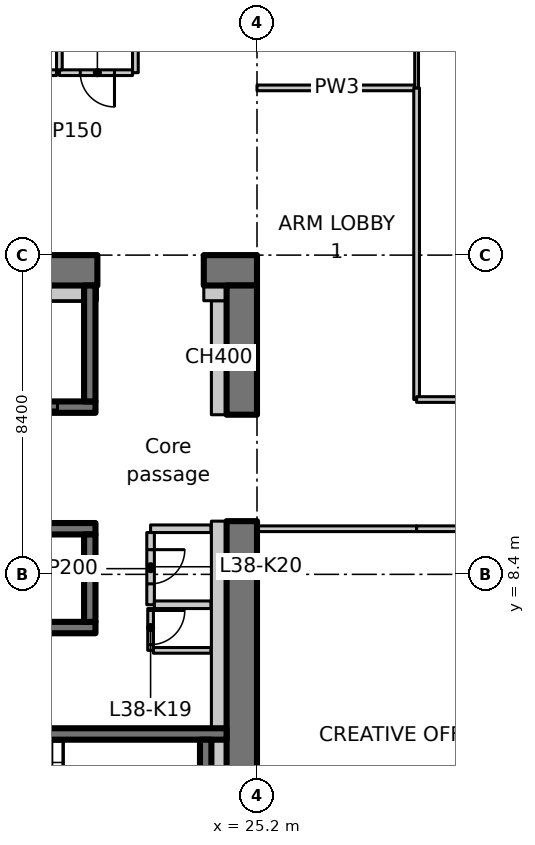
"""IFC4 building model, lengths in metres.
Left out: names, types, materials, properties, quantities, classifications, styles, units other than length and angle.
Written with IfcOpenShell. Run it as: python <this file> out.ifc"""

import sys

from ifc_helpers import new_model, si_unit, direction, frame, frame_2d, origin, place, context, subcontext, project, spatial, polyline, rectangle, outline, extrude, element, fill, save


model = new_model("IFC4")
c1 = context("Model", 3, precision=1e-05, world=origin(), true_north=direction((0.0, 1.0)))
c2 = subcontext(c1, "Body", "Model", "MODEL_VIEW")
j1 = project(units=[si_unit("LENGTHUNIT", "METRE"), si_unit("PLANEANGLEUNIT", "RADIAN")], contexts=[c1])
p1 = place(None, origin())
s1 = spatial("IfcSite", under=j1, at=p1, CompositionType="ELEMENT")
p2 = place(p1, origin())
s2 = spatial("IfcBuilding", under=s1, at=p2, CompositionType="ELEMENT")
p3 = place(p2, frame((0.0, 0.0, 152.9)))
s3 = spatial("IfcBuildingStorey", under=s2, at=p3, CompositionType="ELEMENT", Elevation=152.9)
p4 = place(p3, frame((-1.1, 16.4, 0.0), z_axis=(0.0, 0.0, 1.0), x_axis=(1.0, 0.0, 0.0)))
e1 = element("IfcWall", 1, at=p4, inside=s3, PredefinedType="SHEAR", context=c2, shape_type="SweptSolid", body=[
    extrude(rectangle(XDim=22.1, YDim=0.8, at=frame_2d((11.05, 0.0))), origin(), (0.0, 0.0, 1.0), 3.3),
])
p5 = place(p4, frame((3.15, 0.0, 0.0)))
e2 = element("IfcOpeningElement", 2, at=p5, cuts=e1, PredefinedType="OPENING", context=c2, shape_type="SweptSolid", body=[
    extrude(rectangle(XDim=1.1, YDim=2.3, at=frame_2d((0.55, 1.15))), frame((0.0, 0.41, 0.0), z_axis=(0.0, -1.0, 0.0), x_axis=(1.0, 0.0, 0.0)), (0.0, 0.0, 1.0), 0.82),
])
p6 = place(p3, frame((23.8, 16.4, 0.0), z_axis=(0.0, 0.0, 1.0), x_axis=(1.0, 0.0, 0.0)))
e3 = element("IfcWall", 3, at=p6, inside=s3, PredefinedType="SHEAR", context=c2, shape_type="SweptSolid", body=[
    extrude(rectangle(XDim=1.4, YDim=0.8, at=frame_2d((0.7, 0.0))), origin(), (0.0, 0.0, 1.0), 3.3),
])
p7 = place(p3, frame((24.8, 0.8, 0.0), z_axis=(0.0, 0.0, 1.0), x_axis=(0.0, 1.0, 0.0)))
e4 = element("IfcWall", 4, at=p7, inside=s3, PredefinedType="SHEAR", context=c2, shape_type="SweptSolid", body=[
    extrude(rectangle(XDim=9.0, YDim=0.8, at=frame_2d((4.5, 0.0))), origin(), (0.0, 0.0, 1.0), 3.3),
])
p8 = place(p3, frame((24.8, 12.6, 0.0), z_axis=(0.0, 0.0, 1.0), x_axis=(0.0, 1.0, 0.0)))
e5 = element("IfcWall", 5, at=p8, inside=s3, PredefinedType="SHEAR", context=c2, shape_type="SweptSolid", body=[
    extrude(rectangle(XDim=3.4, YDim=0.8, at=frame_2d((1.7, 0.0))), origin(), (0.0, 0.0, 1.0), 3.3),
])
p9 = place(p3, frame((24.2, 12.6, 0.0), z_axis=(0.0, 0.0, 1.0), x_axis=(0.0, 1.0, 0.0)))
e6 = element("IfcWall", 6, at=p9, inside=s3, PredefinedType="PARTITIONING", context=c2, shape_type="SweptSolid", body=[
    extrude(rectangle(XDim=3.0, YDim=0.4, at=frame_2d((1.5, 0.0))), origin(), (0.0, 0.0, 1.0), 3.3),
])
p10 = place(p3, frame((23.8, 15.8, 0.0), z_axis=(0.0, 0.0, 1.0), x_axis=(1.0, 0.0, 0.0)))
e7 = element("IfcWall", 7, at=p10, inside=s3, PredefinedType="PARTITIONING", context=c2, shape_type="SweptSolid", body=[
    extrude(rectangle(XDim=0.6, YDim=0.4, at=frame_2d((0.3, 0.0))), origin(), (0.0, 0.0, 1.0), 3.3),
])
p11 = place(p3, frame((0.8, 7.0, 0.0), z_axis=(0.0, 0.0, 1.0), x_axis=(1.0, 0.0, 0.0)))
e8 = element("IfcWall", 8, at=p11, inside=s3, PredefinedType="SHEAR", context=c2, shape_type="SweptSolid", body=[
    extrude(rectangle(XDim=20.15, YDim=0.3, at=frame_2d((10.075, 0.0))), origin(), (0.0, 0.0, 1.0), 3.3),
])
p12 = place(p3, frame((0.8, 9.6, 0.0), z_axis=(0.0, 0.0, 1.0), x_axis=(1.0, 0.0, 0.0)))
e9 = element("IfcWall", 9, at=p12, inside=s3, PredefinedType="SHEAR", context=c2, shape_type="SweptSolid", body=[
    extrude(rectangle(XDim=20.15, YDim=0.3, at=frame_2d((10.075, 0.0))), origin(), (0.0, 0.0, 1.0), 3.3),
])
p13 = place(p12, frame((1.25, 0.0, 0.0)))
e10 = element("IfcOpeningElement", 10, at=p13, cuts=e9, PredefinedType="OPENING", context=c2, shape_type="SweptSolid", body=[
    extrude(rectangle(XDim=1.1, YDim=2.3, at=frame_2d((0.55, 1.15))), frame((0.0, 0.16, 0.0), z_axis=(0.0, -1.0, 0.0), x_axis=(1.0, 0.0, 0.0)), (0.0, 0.0, 1.0), 0.32),
])
p14 = place(p12, frame((4.05, 0.0, 0.0)))
e11 = element("IfcOpeningElement", 11, at=p14, cuts=e9, PredefinedType="OPENING", context=c2, shape_type="SweptSolid", body=[
    extrude(rectangle(XDim=1.1, YDim=2.3, at=frame_2d((0.55, 1.15))), frame((0.0, 0.16, 0.0), z_axis=(0.0, -1.0, 0.0), x_axis=(1.0, 0.0, 0.0)), (0.0, 0.0, 1.0), 0.32),
])
p15 = place(p12, frame((6.85, 0.0, 0.0)))
e12 = element("IfcOpeningElement", 12, at=p15, cuts=e9, PredefinedType="OPENING", context=c2, shape_type="SweptSolid", body=[
    extrude(rectangle(XDim=1.1, YDim=2.3, at=frame_2d((0.55, 1.15))), frame((0.0, 0.16, 0.0), z_axis=(0.0, -1.0, 0.0), x_axis=(1.0, 0.0, 0.0)), (0.0, 0.0, 1.0), 0.32),
])
p16 = place(p12, frame((9.65, 0.0, 0.0)))
e13 = element("IfcOpeningElement", 13, at=p16, cuts=e9, PredefinedType="OPENING", context=c2, shape_type="SweptSolid", body=[
    extrude(rectangle(XDim=1.1, YDim=2.3, at=frame_2d((0.55, 1.15))), frame((0.0, 0.16, 0.0), z_axis=(0.0, -1.0, 0.0), x_axis=(1.0, 0.0, 0.0)), (0.0, 0.0, 1.0), 0.32),
])
p17 = place(p12, frame((12.45, 0.0, 0.0)))
e14 = element("IfcOpeningElement", 14, at=p17, cuts=e9, PredefinedType="OPENING", context=c2, shape_type="SweptSolid", body=[
    extrude(rectangle(XDim=1.1, YDim=2.3, at=frame_2d((0.55, 1.15))), frame((0.0, 0.16, 0.0), z_axis=(0.0, -1.0, 0.0), x_axis=(1.0, 0.0, 0.0)), (0.0, 0.0, 1.0), 0.32),
])
p18 = place(p12, frame((15.25, 0.0, 0.0)))
e15 = element("IfcOpeningElement", 15, at=p18, cuts=e9, PredefinedType="OPENING", context=c2, shape_type="SweptSolid", body=[
    extrude(rectangle(XDim=1.1, YDim=2.3, at=frame_2d((0.55, 1.15))), frame((0.0, 0.16, 0.0), z_axis=(0.0, -1.0, 0.0), x_axis=(1.0, 0.0, 0.0)), (0.0, 0.0, 1.0), 0.32),
])
p19 = place(p3, frame((20.8, 7.15, 0.0), z_axis=(0.0, 0.0, 1.0), x_axis=(0.0, 1.0, 0.0)))
e16 = element("IfcWall", 16, at=p19, inside=s3, PredefinedType="SHEAR", context=c2, shape_type="SweptSolid", body=[
    extrude(rectangle(XDim=2.3, YDim=0.3, at=frame_2d((1.15, 0.0))), origin(), (0.0, 0.0, 1.0), 3.3),
])
p20 = place(p3, frame((15.05, 12.8, 0.0), z_axis=(0.0, 0.0, 1.0), x_axis=(1.0, 0.0, 0.0)))
e17 = element("IfcWall", 17, at=p20, inside=s3, PredefinedType="SHEAR", context=c2, shape_type="SweptSolid", body=[
    extrude(rectangle(XDim=5.9, YDim=0.3, at=frame_2d((2.95, 0.0))), origin(), (0.0, 0.0, 1.0), 3.3),
])
p21 = place(p20, frame((3.8, 0.0, 0.0)))
e18 = element("IfcOpeningElement", 18, at=p21, cuts=e17, PredefinedType="OPENING", context=c2, shape_type="SweptSolid", body=[
    extrude(rectangle(XDim=1.1, YDim=2.3, at=frame_2d((0.55, 1.15))), frame((0.0, 0.16, 0.0), z_axis=(0.0, -1.0, 0.0), x_axis=(1.0, 0.0, 0.0)), (0.0, 0.0, 1.0), 0.32),
])
p22 = place(p3, frame((20.8, 12.95, 0.0), z_axis=(0.0, 0.0, 1.0), x_axis=(0.0, 1.0, 0.0)))
e19 = element("IfcWall", 19, at=p22, inside=s3, PredefinedType="SHEAR", context=c2, shape_type="SweptSolid", body=[
    extrude(rectangle(XDim=3.05, YDim=0.3, at=frame_2d((1.525, 0.0))), origin(), (0.0, 0.0, 1.0), 3.3),
])
p23 = place(p3, frame((15.8, 4.2, 0.0), z_axis=(0.0, 0.0, 1.0), x_axis=(1.0, 0.0, 0.0)))
e20 = element("IfcWall", 20, at=p23, inside=s3, PredefinedType="SHEAR", context=c2, shape_type="SweptSolid", body=[
    extrude(rectangle(XDim=8.6, YDim=0.3, at=frame_2d((4.3, 0.0))), origin(), (0.0, 0.0, 1.0), 3.3),
])
p24 = place(p23, frame((0.4, 0.0, 0.0)))
e21 = element("IfcOpeningElement", 21, at=p24, cuts=e20, PredefinedType="OPENING", context=c2, shape_type="SweptSolid", body=[
    extrude(rectangle(XDim=1.0, YDim=2.1, at=frame_2d((0.5, 1.05))), frame((0.0, 0.16, 0.0), z_axis=(0.0, -1.0, 0.0), x_axis=(1.0, 0.0, 0.0)), (0.0, 0.0, 1.0), 0.32),
])
p25 = place(p3, frame((23.85, 1.5, 0.0), z_axis=(0.0, 0.0, 1.0), x_axis=(0.0, 1.0, 0.0)))
e22 = element("IfcWall", 22, at=p25, inside=s3, PredefinedType="SHEAR", context=c2, shape_type="SweptSolid", body=[
    extrude(rectangle(XDim=2.55, YDim=0.3, at=frame_2d((1.275, 0.0))), origin(), (0.0, 0.0, 1.0), 3.3),
])
p26 = place(p3, frame((23.988, 9.6, 0.0), z_axis=(0.0, 0.0, 1.0), x_axis=(-1.0, 0.0, 0.0)))
e23 = element("IfcWall", 23, at=p26, inside=s3, PredefinedType="PARTITIONING", context=c2, shape_type="SweptSolid", body=[
    extrude(rectangle(XDim=1.588, YDim=0.2, at=frame_2d((0.794, 0.0))), origin(), (0.0, 0.0, 1.0), 3.3),
])
p27 = place(p3, frame((22.4, 9.5, 0.0), z_axis=(0.0, 0.0, 1.0), x_axis=(0.0, -1.0, 0.0)))
e24 = element("IfcWall", 24, at=p27, inside=s3, PredefinedType="PARTITIONING", context=c2, shape_type="SweptSolid", body=[
    extrude(rectangle(XDim=1.9, YDim=0.2, at=frame_2d((0.95, 0.0))), origin(), (0.0, 0.0, 1.0), 3.3),
])
p28 = place(p27, frame((0.45, 0.0, 0.0)))
e25 = element("IfcOpeningElement", 25, at=p28, cuts=e24, PredefinedType="OPENING", context=c2, shape_type="SweptSolid", body=[
    extrude(rectangle(XDim=0.9, YDim=2.1, at=frame_2d((0.45, 1.05))), frame((0.0, 0.11, 0.0), z_axis=(0.0, -1.0, 0.0), x_axis=(1.0, 0.0, 0.0)), (0.0, 0.0, 1.0), 0.22),
])
p29 = place(p3, frame((22.5, 7.6, 0.0), z_axis=(0.0, 0.0, 1.0), x_axis=(1.0, 0.0, 0.0)))
e26 = element("IfcWall", 26, at=p29, inside=s3, PredefinedType="PARTITIONING", context=c2, shape_type="SweptSolid", body=[
    extrude(rectangle(XDim=1.488, YDim=0.2, at=frame_2d((0.744, 0.0))), origin(), (0.0, 0.0, 1.0), 3.3),
])
p30 = place(p3, frame((22.0, 23.925, 0.0), z_axis=(0.0, 0.0, 1.0), x_axis=(0.0, -1.0, 0.0)))
e27 = element("IfcWall", 27, at=p30, inside=s3, PredefinedType="PARTITIONING", context=c2, shape_type="SweptSolid", body=[
    extrude(rectangle(XDim=2.325, YDim=0.15, at=frame_2d((1.163, 0.0))), origin(), (0.0, 0.0, 1.0), 3.3),
])
p31 = place(p3, frame((21.925, 21.6, 0.0), z_axis=(0.0, 0.0, 1.0), x_axis=(-1.0, 0.0, 0.0)))
e28 = element("IfcWall", 28, at=p31, inside=s3, PredefinedType="PARTITIONING", context=c2, shape_type="SweptSolid", body=[
    extrude(rectangle(XDim=1.925, YDim=0.15, at=frame_2d((0.962, 0.0))), origin(), (0.0, 0.0, 1.0), 3.3),
])
p32 = place(p31, frame((0.475, 0.0, 0.0)))
e29 = element("IfcOpeningElement", 29, at=p32, cuts=e28, PredefinedType="OPENING", context=c2, shape_type="SweptSolid", body=[
    extrude(rectangle(XDim=0.9, YDim=2.1, at=frame_2d((0.45, 1.05))), frame((0.0, 0.085, 0.0), z_axis=(0.0, -1.0, 0.0), x_axis=(1.0, 0.0, 0.0)), (0.0, 0.0, 1.0), 0.17),
])
p33 = place(p3, frame((20.0, 21.675, 0.0), z_axis=(0.0, 0.0, 1.0), x_axis=(0.0, 1.0, 0.0)))
e30 = element("IfcWall", 30, at=p33, inside=s3, PredefinedType="PARTITIONING", context=c2, shape_type="SweptSolid", body=[
    extrude(rectangle(XDim=2.25, YDim=0.15, at=frame_2d((1.125, 0.0))), origin(), (0.0, 0.0, 1.0), 3.3),
])
p34 = place(p3, frame((19.925, 21.6, 0.0), z_axis=(0.0, 0.0, 1.0), x_axis=(-1.0, 0.0, 0.0)))
e31 = element("IfcWall", 31, at=p34, inside=s3, PredefinedType="PARTITIONING", context=c2, shape_type="SweptSolid", body=[
    extrude(rectangle(XDim=2.325, YDim=0.15, at=frame_2d((1.163, 0.0))), origin(), (0.0, 0.0, 1.0), 3.3),
])
p35 = place(p34, frame((0.675, 0.0, 0.0)))
e32 = element("IfcOpeningElement", 32, at=p35, cuts=e31, PredefinedType="OPENING", context=c2, shape_type="SweptSolid", body=[
    extrude(rectangle(XDim=0.9, YDim=2.1, at=frame_2d((0.45, 1.05))), frame((0.0, 0.085, 0.0), z_axis=(0.0, -1.0, 0.0), x_axis=(1.0, 0.0, 0.0)), (0.0, 0.0, 1.0), 0.17),
])
p36 = place(p3, frame((22.4, 7.5, 0.0), z_axis=(0.0, 0.0, 1.0), x_axis=(0.0, -1.0, 0.0)))
e33 = element("IfcWall", 33, at=p36, inside=s3, PredefinedType="PARTITIONING", context=c2, shape_type="SweptSolid", body=[
    extrude(rectangle(XDim=1.1, YDim=0.15, at=frame_2d((0.55, 0.0))), origin(), (0.0, 0.0, 1.0), 3.3),
])
p37 = place(p36, frame((0.05, 0.0, 0.0)))
e34 = element("IfcOpeningElement", 34, at=p37, cuts=e33, PredefinedType="OPENING", context=c2, shape_type="SweptSolid", body=[
    extrude(rectangle(XDim=0.9, YDim=2.1, at=frame_2d((0.45, 1.05))), frame((0.0, 0.085, 0.0), z_axis=(0.0, -1.0, 0.0), x_axis=(1.0, 0.0, 0.0)), (0.0, 0.0, 1.0), 0.17),
])
p38 = place(p3, frame((22.475, 6.4, 0.0), z_axis=(0.0, 0.0, 1.0), x_axis=(1.0, 0.0, 0.0)))
e35 = element("IfcWall", 35, at=p38, inside=s3, PredefinedType="PARTITIONING", context=c2, shape_type="SweptSolid", body=[
    extrude(rectangle(XDim=1.513, YDim=0.15, at=frame_2d((0.756, 0.0))), origin(), (0.0, 0.0, 1.0), 3.3),
])
p39 = place(p3, frame((18.15, 15.8, 0.0), z_axis=(0.0, 0.0, 1.0), x_axis=(1.0, 0.0, 0.0)))
e36 = element("IfcWall", 36, at=p39, inside=s3, PredefinedType="PARTITIONING", context=c2, shape_type="SweptSolid", body=[
    extrude(rectangle(XDim=2.5, YDim=0.4, at=frame_2d((1.25, 0.0))), origin(), (0.0, 0.0, 1.0), 3.3),
])
p40 = place(p3, frame((20.95, 15.8, 0.0), z_axis=(0.0, 0.0, 1.0), x_axis=(1.0, 0.0, 0.0)))
e37 = element("IfcWall", 37, at=p40, inside=s3, PredefinedType="PARTITIONING", context=c2, shape_type="SweptSolid", body=[
    extrude(rectangle(XDim=0.05, YDim=0.4, at=frame_2d((0.025, 0.0))), origin(), (0.0, 0.0, 1.0), 3.3),
])
p41 = place(p3, frame((24.2, 1.5, 0.0), z_axis=(0.0, 0.0, 1.0), x_axis=(0.0, 1.0, 0.0)))
e38 = element("IfcWall", 38, at=p41, inside=s3, PredefinedType="PARTITIONING", context=c2, shape_type="SweptSolid", body=[
    extrude(rectangle(XDim=2.55, YDim=0.4, at=frame_2d((1.275, 0.0))), origin(), (0.0, 0.0, 1.0), 3.3),
])
p42 = place(p3, frame((24.2, 4.35, 0.0), z_axis=(0.0, 0.0, 1.0), x_axis=(0.0, 1.0, 0.0)))
e39 = element("IfcWall", 39, at=p42, inside=s3, PredefinedType="PARTITIONING", context=c2, shape_type="SweptSolid", body=[
    extrude(rectangle(XDim=5.45, YDim=0.4, at=frame_2d((2.725, 0.0))), origin(), (0.0, 0.0, 1.0), 3.3),
])
for number, where, z_axis, x_axis in (
    (40, (25.2, 21.2, 0.0), (0.0, 0.0, 1.0), (1.0, 0.0, 0.0)),
    (41, (29.4, 9.6, 0.0), (0.0, 0.0, 1.0), (-1.0, 0.0, 0.0)),
):
    element("IfcWall", number, at=place(p3, frame(where, z_axis=z_axis, x_axis=x_axis)), inside=s3, PredefinedType="PARTITIONING", context=c2, shape_type="SweptSolid", body=[
        extrude(rectangle(XDim=4.2, YDim=0.15, at=frame_2d((2.1, 0.0))), origin(), (0.0, 0.0, 1.0), 3.28),
    ])
p43 = place(p3, frame((29.4, 21.2, 0.0), z_axis=(0.0, 0.0, 1.0), x_axis=(0.0, -1.0, 0.0)))
e42 = element("IfcWall", 42, at=p43, inside=s3, PredefinedType="PARTITIONING", context=c2, shape_type="SweptSolid", body=[
    extrude(rectangle(XDim=8.2, YDim=0.15, at=frame_2d((4.1, 0.0))), origin(), (0.0, 0.0, 1.0), 3.28),
])
p44 = place(p3, frame((29.4, 27.429, 0.0), z_axis=(0.0, 0.0, 1.0), x_axis=(0.0, -1.0, 0.0)))
e43 = element("IfcWall", 43, at=p44, inside=s3, PredefinedType="PARTITIONING", context=c2, shape_type="SweptSolid", body=[
    extrude(outline(polyline([(0.0, 0.0), (6.229, 0.0), (6.229, 3.28), (2.679, 3.28), (2.677, 2.93), (1.781, 2.93), (1.779, 3.28), (0.154, 3.28), (0.0, 3.28), (0.0, 0.0)])), frame((0.0, 0.05, 0.0), z_axis=(0.0, -1.0, 0.0), x_axis=(1.0, 0.0, 0.0)), (0.0, 0.0, 1.0), 0.1),
])
p45 = place(p3, frame((33.6, 9.6, 0.0), z_axis=(0.0, 0.0, 1.0), x_axis=(-1.0, 0.0, 0.0)))
e44 = element("IfcWall", 44, at=p45, inside=s3, PredefinedType="PARTITIONING", context=c2, shape_type="SweptSolid", body=[
    extrude(rectangle(XDim=4.2, YDim=0.15, at=frame_2d((2.1, 0.0))), origin(), (0.0, 0.0, 1.0), 3.28),
])
p46 = place(p45, frame((1.2, 0.0, 0.0)))
e45 = element("IfcOpeningElement", 45, at=p46, cuts=e44, PredefinedType="OPENING", context=c2, shape_type="SweptSolid", body=[
    extrude(rectangle(XDim=1.6, YDim=2.1, at=frame_2d((0.8, 1.05))), frame((0.0, 0.085, 0.0), z_axis=(0.0, -1.0, 0.0), x_axis=(1.0, 0.0, 0.0)), (0.0, 0.0, 1.0), 0.17),
])
p47 = place(p3, frame((29.4, 13.0, 0.0), z_axis=(0.0, 0.0, 1.0), x_axis=(1.0, 0.0, 0.0)))
e46 = element("IfcWall", 46, at=p47, inside=s3, PredefinedType="PARTITIONING", context=c2, shape_type="SweptSolid", body=[
    extrude(rectangle(XDim=8.4, YDim=0.15, at=frame_2d((4.2, 0.0))), origin(), (0.0, 0.0, 1.0), 3.28),
])
p48 = place(p47, frame((3.3, 0.0, 0.0)))
e47 = element("IfcOpeningElement", 47, at=p48, cuts=e46, PredefinedType="OPENING", context=c2, shape_type="SweptSolid", body=[
    extrude(rectangle(XDim=1.8, YDim=2.1, at=frame_2d((0.9, 1.05))), frame((0.0, 0.085, 0.0), z_axis=(0.0, -1.0, 0.0), x_axis=(1.0, 0.0, 0.0)), (0.0, 0.0, 1.0), 0.17),
])
p49 = place(p21, origin())
e48 = element("IfcDoor", 48, at=p49, inside=s3, OperationType="SLIDING_TO_LEFT", PredefinedType="DOOR", context=c2, shape_type="SweptSolid", body=[
    extrude(rectangle(XDim=1.1, YDim=2.3, at=frame_2d((0.55, 1.15))), frame((0.0, 0.025, 0.0), z_axis=(0.0, -1.0, 0.0), x_axis=(1.0, 0.0, 0.0)), (0.0, 0.0, 1.0), 0.05),
])
fill(e18, e48)
p50 = place(p37, origin())
e49 = element("IfcDoor", 49, at=p50, inside=s3, OperationType="SINGLE_SWING_LEFT", PredefinedType="DOOR", context=c2, shape_type="SweptSolid", body=[
    extrude(rectangle(XDim=0.9, YDim=2.1, at=frame_2d((0.45, 1.05))), frame((0.0, 0.025, 0.0), z_axis=(0.0, -1.0, 0.0), x_axis=(1.0, 0.0, 0.0)), (0.0, 0.0, 1.0), 0.05),
])
fill(e34, e49)
p51 = place(p28, origin())
e50 = element("IfcDoor", 50, at=p51, inside=s3, OperationType="SINGLE_SWING_RIGHT", PredefinedType="DOOR", context=c2, shape_type="SweptSolid", body=[
    extrude(rectangle(XDim=0.9, YDim=2.1, at=frame_2d((0.45, 1.05))), frame((0.0, 0.025, 0.0), z_axis=(0.0, -1.0, 0.0), x_axis=(1.0, 0.0, 0.0)), (0.0, 0.0, 1.0), 0.05),
])
fill(e25, e50)
p52 = place(p32, origin())
e51 = element("IfcDoor", 51, at=p52, inside=s3, OperationType="SINGLE_SWING_RIGHT", PredefinedType="DOOR", context=c2, shape_type="SweptSolid", body=[
    extrude(rectangle(XDim=0.9, YDim=2.1, at=frame_2d((0.45, 1.05))), frame((0.0, 0.025, 0.0), z_axis=(0.0, -1.0, 0.0), x_axis=(1.0, 0.0, 0.0)), (0.0, 0.0, 1.0), 0.05),
])
fill(e29, e51)
save(model, sys.argv[1])
